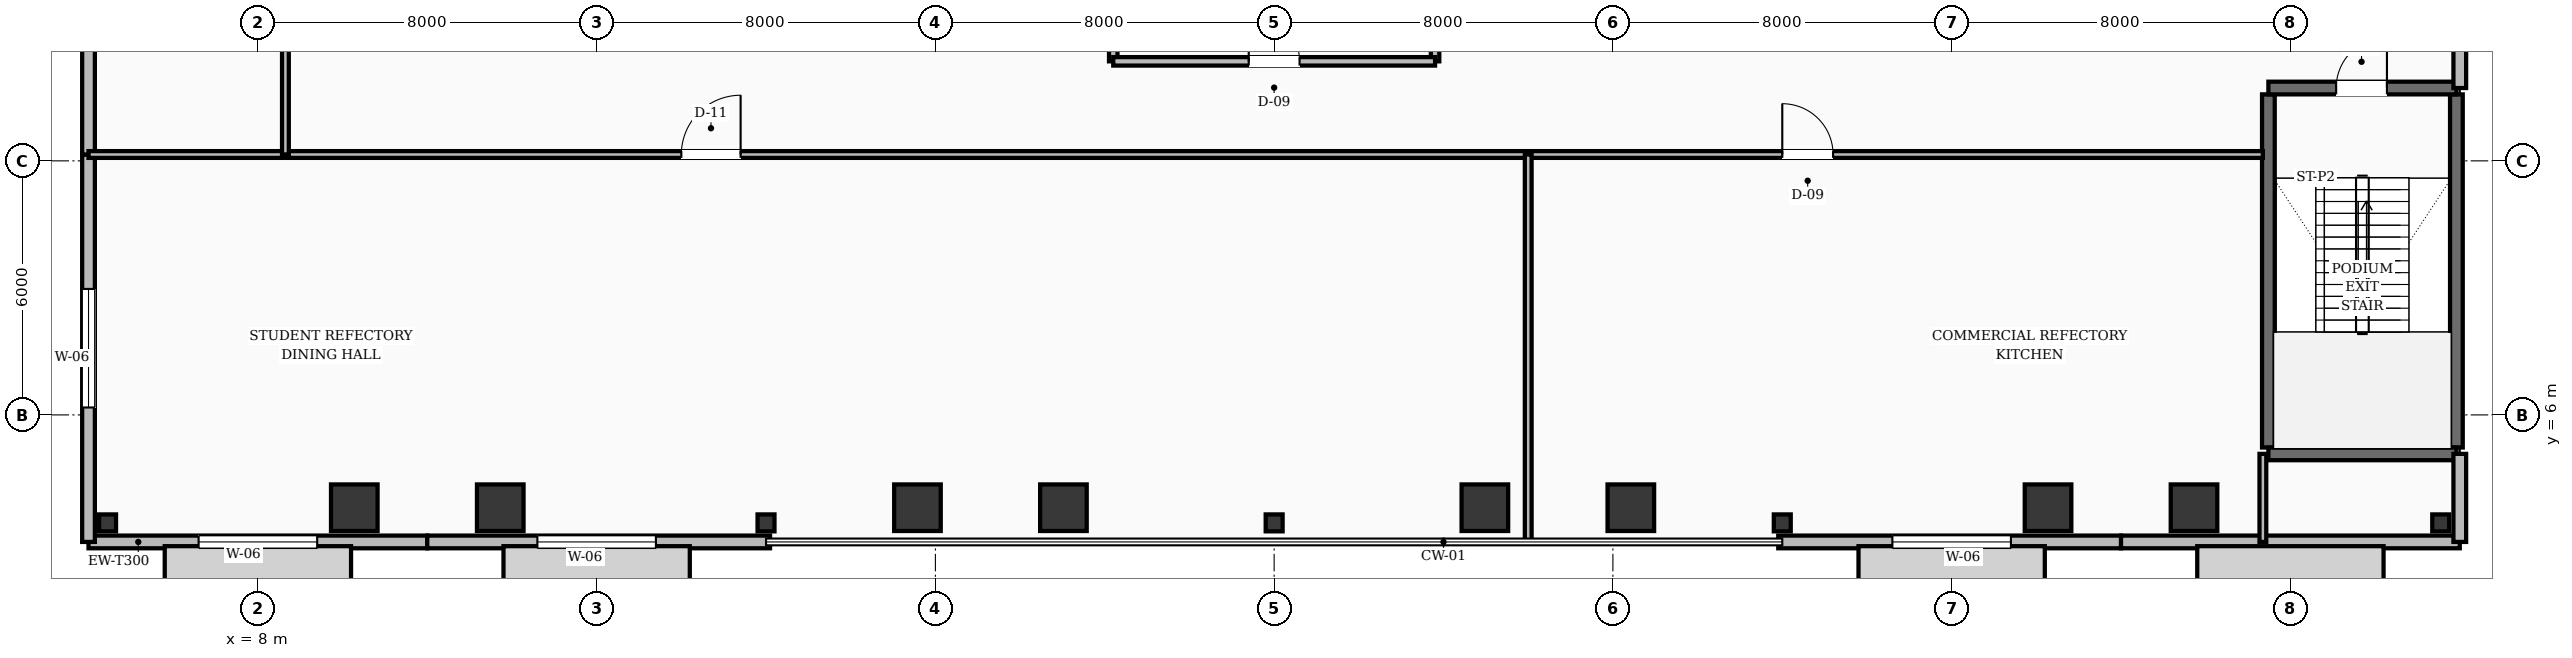
"""IFC4 building model, lengths in metres.
Left out: names, types, materials, properties, quantities, classifications, styles, units other than length and angle.
Written with IfcOpenShell. Run it as: python <this file> out.ifc"""

import sys

from ifc_helpers import new_model, si_unit, direction, frame, frame_2d, origin, origin_2d, place, context, subcontext, project, spatial, rectangle, hollow_circle, i_section, extrude, element, fill, save


model = new_model("IFC4")
c1 = context("Model", 3, precision=1e-05, world=origin(), true_north=direction((0.0, 1.0)))
c2 = subcontext(c1, "Body", "Model", "MODEL_VIEW")
j1 = project(units=[si_unit("LENGTHUNIT", "METRE"), si_unit("PLANEANGLEUNIT", "RADIAN")], contexts=[c1])
p1 = place(None, origin())
s1 = spatial("IfcSite", under=j1, at=p1, CompositionType="ELEMENT")
p2 = place(p1, origin())
s2 = spatial("IfcBuilding", under=s1, at=p2, CompositionType="ELEMENT")
p3 = place(p2, frame((0.0, 0.0, 5.2)))
s3 = spatial("IfcBuildingStorey", under=s2, at=p3, CompositionType="ELEMENT", Elevation=5.2)
for number, where, z_axis, x_axis in (
    (1, (55.48, 5.23, 0.0), (0.0, 0.0, 1.0), (0.0, 1.0, 0.0)),
    (2, (59.92, 5.23, 0.0), (0.0, 0.0, 1.0), (0.0, 1.0, 0.0)),
):
    element("IfcWall", number, at=place(p3, frame(where, z_axis=z_axis, x_axis=x_axis)), inside=s3, PredefinedType="SHEAR", context=c2, shape_type="SweptSolid", body=[
        extrude(rectangle(XDim=8.34, YDim=0.3, at=frame_2d((4.17, 0.0))), origin(), (0.0, 0.0, 1.0), 4.8),
    ])
p4 = place(p3, frame((55.48, 5.08, 0.0), z_axis=(0.0, 0.0, 1.0), x_axis=(1.0, 0.0, 0.0)))
e3 = element("IfcWall", 3, at=p4, inside=s3, PredefinedType="SHEAR", context=c2, shape_type="SweptSolid", body=[
    extrude(rectangle(XDim=4.44, YDim=0.3, at=frame_2d((2.22, 0.0))), origin(), (0.0, 0.0, 1.0), 4.8),
])
p5 = place(p3, frame((55.48, 13.72, 0.0), z_axis=(0.0, 0.0, 1.0), x_axis=(1.0, 0.0, 0.0)))
e4 = element("IfcWall", 4, at=p5, inside=s3, PredefinedType="SHEAR", context=c2, shape_type="SweptSolid", body=[
    extrude(rectangle(XDim=4.44, YDim=0.3, at=frame_2d((2.22, 0.0))), origin(), (0.0, 0.0, 1.0), 4.8),
])
p6 = place(p5, frame((1.6, 0.0, 0.0)))
e5 = element("IfcOpeningElement", 5, at=p6, cuts=e4, PredefinedType="OPENING", context=c2, shape_type="SweptSolid", body=[
    extrude(rectangle(XDim=1.2, YDim=2.1, at=frame_2d((0.6, 1.05))), frame((0.0, 0.16, 0.0), z_axis=(0.0, -1.0, 0.0), x_axis=(1.0, 0.0, 0.0)), (0.0, 0.0, 1.0), 0.32),
])
for number, where, z_axis, x_axis in (
    (6, (4.45, 3.45, 0.0), (0.0, 0.0, 1.0), (1.0, 0.0, 0.0)),
    (7, (20.0, 3.45, 0.0), (0.0, 0.0, 1.0), (1.0, 0.0, 0.0)),
    (8, (32.0, 3.45, 0.0), (0.0, 0.0, 1.0), (1.0, 0.0, 0.0)),
    (9, (44.0, 3.45, 0.0), (0.0, 0.0, 1.0), (1.0, 0.0, 0.0)),
    (10, (59.55, 3.45, 0.0), (0.0, 0.0, 1.0), (1.0, 0.0, 0.0)),
):
    element("IfcColumn", number, at=place(p3, frame(where, z_axis=z_axis, x_axis=x_axis)), inside=s3, PredefinedType="COLUMN", context=c2, shape_type="SweptSolid", body=[
        extrude(i_section(OverallWidth=0.4, OverallDepth=0.4, WebThickness=0.013, FlangeThickness=0.021, FilletRadius=0.018, at=origin_2d()), origin(), (0.0, 0.0, 1.0), 4.8),
    ])
for number, where, z_axis, x_axis in (
    (11, (10.53, 3.695, 0.0), (-0.105, 0.047, 0.993), (-0.407, -0.913, 0.0)),
    (12, (13.47, 3.695, 0.0), (0.105, 0.047, 0.993), (-0.407, 0.913, 0.0)),
    (13, (23.83, 3.695, 0.0), (-0.105, 0.047, 0.993), (-0.407, -0.913, 0.0)),
    (14, (26.77, 3.695, 0.0), (0.105, 0.047, 0.993), (-0.407, 0.913, 0.0)),
    (15, (37.23, 3.695, 0.0), (-0.105, 0.047, 0.993), (-0.407, -0.913, 0.0)),
    (16, (40.17, 3.695, 0.0), (0.105, 0.047, 0.993), (-0.407, 0.913, 0.0)),
    (17, (50.53, 3.695, 0.0), (-0.105, 0.047, 0.993), (-0.407, -0.913, 0.0)),
    (18, (53.47, 3.695, 0.0), (0.105, 0.047, 0.993), (-0.407, 0.913, 0.0)),
):
    element("IfcColumn", number, at=place(p3, frame(where, z_axis=z_axis, x_axis=x_axis)), inside=s3, PredefinedType="COLUMN", context=c2, shape_type="SweptSolid", body=[
        extrude(hollow_circle(Radius=0.55, WallThickness=0.05, at=origin_2d()), origin(), (0.0, 0.0, 1.0), 4.832),
    ])
p7 = place(p3, frame((4.0, 3.0, 0.0), z_axis=(0.0, 0.0, 1.0), x_axis=(1.0, 0.0, 0.0)))
e19 = element("IfcWall", 19, at=p7, inside=s3, PredefinedType="STANDARD", context=c2, shape_type="SweptSolid", body=[
    extrude(rectangle(XDim=8.0, YDim=0.3, at=frame_2d((4.0, 0.0))), origin(), (0.0, 0.0, 1.0), 3.57),
])
p8 = place(p7, frame((2.6, 0.0, 0.85)))
e20 = element("IfcOpeningElement", 20, at=p8, cuts=e19, PredefinedType="OPENING", context=c2, shape_type="SweptSolid", body=[
    extrude(rectangle(XDim=2.8, YDim=2.3, at=frame_2d((1.4, 1.15))), frame((0.0, 0.16, 0.0), z_axis=(0.0, -1.0, 0.0), x_axis=(1.0, 0.0, 0.0)), (0.0, 0.0, 1.0), 0.32),
])
p9 = place(p3, frame((12.0, 3.0, 0.0), z_axis=(0.0, 0.0, 1.0), x_axis=(1.0, 0.0, 0.0)))
e21 = element("IfcWall", 21, at=p9, inside=s3, PredefinedType="STANDARD", context=c2, shape_type="SweptSolid", body=[
    extrude(rectangle(XDim=8.095, YDim=0.3, at=frame_2d((4.047, 0.0))), origin(), (0.0, 0.0, 1.0), 3.57),
])
p10 = place(p9, frame((2.6, 0.0, 0.85)))
e22 = element("IfcOpeningElement", 22, at=p10, cuts=e21, PredefinedType="OPENING", context=c2, shape_type="SweptSolid", body=[
    extrude(rectangle(XDim=2.8, YDim=2.3, at=frame_2d((1.4, 1.15))), frame((0.0, 0.16, 0.0), z_axis=(0.0, -1.0, 0.0), x_axis=(1.0, 0.0, 0.0)), (0.0, 0.0, 1.0), 0.32),
])
p11 = place(p3, frame((43.905, 3.0, 0.0), z_axis=(0.0, 0.0, 1.0), x_axis=(1.0, 0.0, 0.0)))
e23 = element("IfcWall", 23, at=p11, inside=s3, PredefinedType="STANDARD", context=c2, shape_type="SweptSolid", body=[
    extrude(rectangle(XDim=8.095, YDim=0.3, at=frame_2d((4.047, 0.0))), origin(), (0.0, 0.0, 1.0), 3.57),
])
p12 = place(p11, frame((2.695, 0.0, 0.85)))
e24 = element("IfcOpeningElement", 24, at=p12, cuts=e23, PredefinedType="OPENING", context=c2, shape_type="SweptSolid", body=[
    extrude(rectangle(XDim=2.8, YDim=2.3, at=frame_2d((1.4, 1.15))), frame((0.0, 0.16, 0.0), z_axis=(0.0, -1.0, 0.0), x_axis=(1.0, 0.0, 0.0)), (0.0, 0.0, 1.0), 0.32),
])
p13 = place(p3, frame((52.0, 3.0, 0.0), z_axis=(0.0, 0.0, 1.0), x_axis=(1.0, 0.0, 0.0)))
e25 = element("IfcWall", 25, at=p13, inside=s3, PredefinedType="STANDARD", context=c2, shape_type="SweptSolid", body=[
    extrude(rectangle(XDim=8.0, YDim=0.3, at=frame_2d((4.0, 0.0))), origin(), (0.0, 0.0, 1.0), 3.57),
])
p14 = place(p3, frame((4.0, 12.15, 0.0), z_axis=(0.0, 0.0, 1.0), x_axis=(0.0, -1.0, 0.0)))
e26 = element("IfcWall", 26, at=p14, inside=s3, PredefinedType="STANDARD", context=c2, shape_type="SweptSolid", body=[
    extrude(rectangle(XDim=9.15, YDim=0.3, at=frame_2d((4.575, 0.0))), origin(), (0.0, 0.0, 1.0), 3.57),
])
p15 = place(p14, frame((3.175, 0.0, 0.85)))
e27 = element("IfcOpeningElement", 27, at=p15, cuts=e26, PredefinedType="OPENING", context=c2, shape_type="SweptSolid", body=[
    extrude(rectangle(XDim=2.8, YDim=2.3, at=frame_2d((1.4, 1.15))), frame((0.0, 0.16, 0.0), z_axis=(0.0, -1.0, 0.0), x_axis=(1.0, 0.0, 0.0)), (0.0, 0.0, 1.0), 0.32),
])
p16 = place(p3, frame((4.0, 22.0, 0.0), z_axis=(0.0, 0.0, 1.0), x_axis=(0.0, -1.0, 0.0)))
e28 = element("IfcWall", 28, at=p16, inside=s3, PredefinedType="STANDARD", context=c2, shape_type="SweptSolid", body=[
    extrude(rectangle(XDim=9.85, YDim=0.3, at=frame_2d((4.925, 0.0))), origin(), (0.0, 0.0, 1.0), 3.57),
])
p17 = place(p16, frame((3.525, 0.0, 0.85)))
e29 = element("IfcOpeningElement", 29, at=p17, cuts=e28, PredefinedType="OPENING", context=c2, shape_type="SweptSolid", body=[
    extrude(rectangle(XDim=2.8, YDim=2.3, at=frame_2d((1.4, 1.15))), frame((0.0, 0.16, 0.0), z_axis=(0.0, -1.0, 0.0), x_axis=(1.0, 0.0, 0.0)), (0.0, 0.0, 1.0), 0.32),
])
p18 = place(p3, frame((60.0, 3.0, 0.0), z_axis=(0.0, 0.0, 1.0), x_axis=(0.0, 1.0, 0.0)))
e30 = element("IfcWall", 30, at=p18, inside=s3, PredefinedType="STANDARD", context=c2, shape_type="SweptSolid", body=[
    extrude(rectangle(XDim=2.08, YDim=0.3, at=frame_2d((1.04, 0.0))), origin(), (0.0, 0.0, 1.0), 3.57),
])
p19 = place(p3, frame((60.0, 13.72, 0.0), z_axis=(0.0, 0.0, 1.0), x_axis=(0.0, 1.0, 0.0)))
e31 = element("IfcWall", 31, at=p19, inside=s3, PredefinedType="STANDARD", context=c2, shape_type="SweptSolid", body=[
    extrude(rectangle(XDim=1.83, YDim=0.3, at=frame_2d((0.915, 0.0))), origin(), (0.0, 0.0, 1.0), 3.57),
])
for number, where, z_axis, x_axis in (
    (32, (28.2, 14.35, 0.0), (0.0, 0.0, 1.0), (0.0, 1.0, 0.0)),
    (33, (35.8, 14.35, 0.0), (0.0, 0.0, 1.0), (0.0, 1.0, 0.0)),
):
    element("IfcWall", number, at=place(p3, frame(where, z_axis=z_axis, x_axis=x_axis)), inside=s3, PredefinedType="SOLIDWALL", context=c2, shape_type="SweptSolid", body=[
        extrude(rectangle(XDim=2.2, YDim=0.2, at=frame_2d((1.1, 0.0))), origin(), (0.0, 0.0, 1.0), 3.52),
    ])
p20 = place(p3, frame((28.2, 14.35, 0.0), z_axis=(0.0, 0.0, 1.0), x_axis=(1.0, 0.0, 0.0)))
e34 = element("IfcWall", 34, at=p20, inside=s3, PredefinedType="SOLIDWALL", context=c2, shape_type="SweptSolid", body=[
    extrude(rectangle(XDim=7.6, YDim=0.2, at=frame_2d((3.8, 0.0))), origin(), (0.0, 0.0, 1.0), 3.52),
])
p21 = place(p20, frame((3.2, 0.0, 0.0)))
e35 = element("IfcOpeningElement", 35, at=p21, cuts=e34, PredefinedType="OPENING", context=c2, shape_type="SweptSolid", body=[
    extrude(rectangle(XDim=1.2, YDim=2.1, at=frame_2d((0.6, 1.05))), frame((0.0, 0.11, 0.0), z_axis=(0.0, -1.0, 0.0), x_axis=(1.0, 0.0, 0.0)), (0.0, 0.0, 1.0), 0.22),
])
p22 = place(p3, frame((4.0, 12.15, 0.0), z_axis=(0.0, 0.0, 1.0), x_axis=(1.0, 0.0, 0.0)))
e36 = element("IfcWall", 36, at=p22, inside=s3, PredefinedType="SOLIDWALL", context=c2, shape_type="SweptSolid", body=[
    extrude(rectangle(XDim=51.35, YDim=0.16, at=frame_2d((25.675, 0.0))), origin(), (0.0, 0.0, 1.0), 3.52),
])
p23 = place(p22, frame((14.0, 0.0, 0.0)))
e37 = element("IfcOpeningElement", 37, at=p23, cuts=e36, PredefinedType="OPENING", context=c2, shape_type="SweptSolid", body=[
    extrude(rectangle(XDim=1.4, YDim=2.15, at=frame_2d((0.7, 1.075))), frame((0.0, 0.09, 0.0), z_axis=(0.0, -1.0, 0.0), x_axis=(1.0, 0.0, 0.0)), (0.0, 0.0, 1.0), 0.18),
])
p24 = place(p22, frame((40.0, 0.0, 0.0)))
e38 = element("IfcOpeningElement", 38, at=p24, cuts=e36, PredefinedType="OPENING", context=c2, shape_type="SweptSolid", body=[
    extrude(rectangle(XDim=1.2, YDim=2.1, at=frame_2d((0.6, 1.05))), frame((0.0, 0.09, 0.0), z_axis=(0.0, -1.0, 0.0), x_axis=(1.0, 0.0, 0.0)), (0.0, 0.0, 1.0), 0.18),
])
p25 = place(p3, frame((8.65, 12.15, 0.0), z_axis=(0.0, 0.0, 1.0), x_axis=(0.0, 1.0, 0.0)))
e39 = element("IfcWall", 39, at=p25, inside=s3, PredefinedType="SOLIDWALL", context=c2, shape_type="SweptSolid", body=[
    extrude(rectangle(XDim=20.25, YDim=0.16, at=frame_2d((10.125, 0.0))), origin(), (0.0, 0.0, 1.0), 3.52),
])
p26 = place(p25, frame((8.0, 0.0, 0.0)))
e40 = element("IfcOpeningElement", 40, at=p26, cuts=e39, PredefinedType="OPENING", context=c2, shape_type="SweptSolid", body=[
    extrude(rectangle(XDim=1.0, YDim=2.1, at=frame_2d((0.5, 1.05))), frame((0.0, 0.09, 0.0), z_axis=(0.0, -1.0, 0.0), x_axis=(1.0, 0.0, 0.0)), (0.0, 0.0, 1.0), 0.18),
])
p27 = place(p3, frame((38.0, 3.0, 0.0), z_axis=(0.0, 0.0, 1.0), x_axis=(0.0, 1.0, 0.0)))
e41 = element("IfcWall", 41, at=p27, inside=s3, PredefinedType="SOLIDWALL", context=c2, shape_type="SweptSolid", body=[
    extrude(rectangle(XDim=9.15, YDim=0.16, at=frame_2d((4.575, 0.0))), origin(), (0.0, 0.0, 1.0), 3.52),
])
p28 = place(p3, frame((55.35, 3.0, 0.0), z_axis=(0.0, 0.0, 1.0), x_axis=(0.0, 1.0, 0.0)))
e42 = element("IfcWall", 42, at=p28, inside=s3, PredefinedType="SOLIDWALL", context=c2, shape_type="SweptSolid", body=[
    extrude(rectangle(XDim=2.08, YDim=0.16, at=frame_2d((1.04, 0.0))), origin(), (0.0, 0.0, 1.0), 3.52),
])
p29 = place(p8, origin())
e43 = element("IfcWindow", 43, at=p29, inside=s3, PartitioningType="SINGLE_PANEL", PredefinedType="WINDOW", context=c2, shape_type="SweptSolid", body=[
    extrude(rectangle(XDim=2.8, YDim=2.3, at=frame_2d((1.4, 1.15))), frame((0.0, 0.03, 0.0), z_axis=(0.0, -1.0, 0.0), x_axis=(1.0, 0.0, 0.0)), (0.0, 0.0, 1.0), 0.06),
])
fill(e20, e43)
p30 = place(p10, origin())
e44 = element("IfcWindow", 44, at=p30, inside=s3, PartitioningType="SINGLE_PANEL", PredefinedType="WINDOW", context=c2, shape_type="SweptSolid", body=[
    extrude(rectangle(XDim=2.8, YDim=2.3, at=frame_2d((1.4, 1.15))), frame((0.0, 0.03, 0.0), z_axis=(0.0, -1.0, 0.0), x_axis=(1.0, 0.0, 0.0)), (0.0, 0.0, 1.0), 0.06),
])
fill(e22, e44)
p31 = place(p12, origin())
e45 = element("IfcWindow", 45, at=p31, inside=s3, PartitioningType="SINGLE_PANEL", PredefinedType="WINDOW", context=c2, shape_type="SweptSolid", body=[
    extrude(rectangle(XDim=2.8, YDim=2.3, at=frame_2d((1.4, 1.15))), frame((0.0, 0.03, 0.0), z_axis=(0.0, -1.0, 0.0), x_axis=(1.0, 0.0, 0.0)), (0.0, 0.0, 1.0), 0.06),
])
fill(e24, e45)
p32 = place(p15, origin())
e46 = element("IfcWindow", 46, at=p32, inside=s3, PartitioningType="SINGLE_PANEL", PredefinedType="WINDOW", context=c2, shape_type="SweptSolid", body=[
    extrude(rectangle(XDim=2.8, YDim=2.3, at=frame_2d((1.4, 1.15))), frame((0.0, 0.03, 0.0), z_axis=(0.0, -1.0, 0.0), x_axis=(1.0, 0.0, 0.0)), (0.0, 0.0, 1.0), 0.06),
])
fill(e27, e46)
p33 = place(p6, origin())
e47 = element("IfcDoor", 47, at=p33, inside=s3, OperationType="SINGLE_SWING_RIGHT", PredefinedType="DOOR", context=c2, shape_type="SweptSolid", body=[
    extrude(rectangle(XDim=1.2, YDim=2.1, at=frame_2d((0.6, 1.05))), frame((0.0, 0.025, 0.0), z_axis=(0.0, -1.0, 0.0), x_axis=(1.0, 0.0, 0.0)), (0.0, 0.0, 1.0), 0.05),
])
fill(e5, e47)
p34 = place(p21, origin())
e48 = element("IfcDoor", 48, at=p34, inside=s3, OperationType="SINGLE_SWING_LEFT", PredefinedType="DOOR", context=c2, shape_type="SweptSolid", body=[
    extrude(rectangle(XDim=1.2, YDim=2.1, at=frame_2d((0.6, 1.05))), frame((0.0, 0.025, 0.0), z_axis=(0.0, -1.0, 0.0), x_axis=(1.0, 0.0, 0.0)), (0.0, 0.0, 1.0), 0.05),
])
fill(e35, e48)
p35 = place(p23, origin())
e49 = element("IfcDoor", 49, at=p35, inside=s3, OperationType="SINGLE_SWING_RIGHT", PredefinedType="DOOR", context=c2, shape_type="SweptSolid", body=[
    extrude(rectangle(XDim=1.4, YDim=2.15, at=frame_2d((0.7, 1.075))), frame((0.0, 0.025, 0.0), z_axis=(0.0, -1.0, 0.0), x_axis=(1.0, 0.0, 0.0)), (0.0, 0.0, 1.0), 0.05),
])
fill(e37, e49)
p36 = place(p24, origin())
e50 = element("IfcDoor", 50, at=p36, inside=s3, OperationType="SINGLE_SWING_LEFT", PredefinedType="DOOR", context=c2, shape_type="SweptSolid", body=[
    extrude(rectangle(XDim=1.2, YDim=2.1, at=frame_2d((0.6, 1.05))), frame((0.0, 0.025, 0.0), z_axis=(0.0, -1.0, 0.0), x_axis=(1.0, 0.0, 0.0)), (0.0, 0.0, 1.0), 0.05),
])
fill(e38, e50)
save(model, sys.argv[1])
